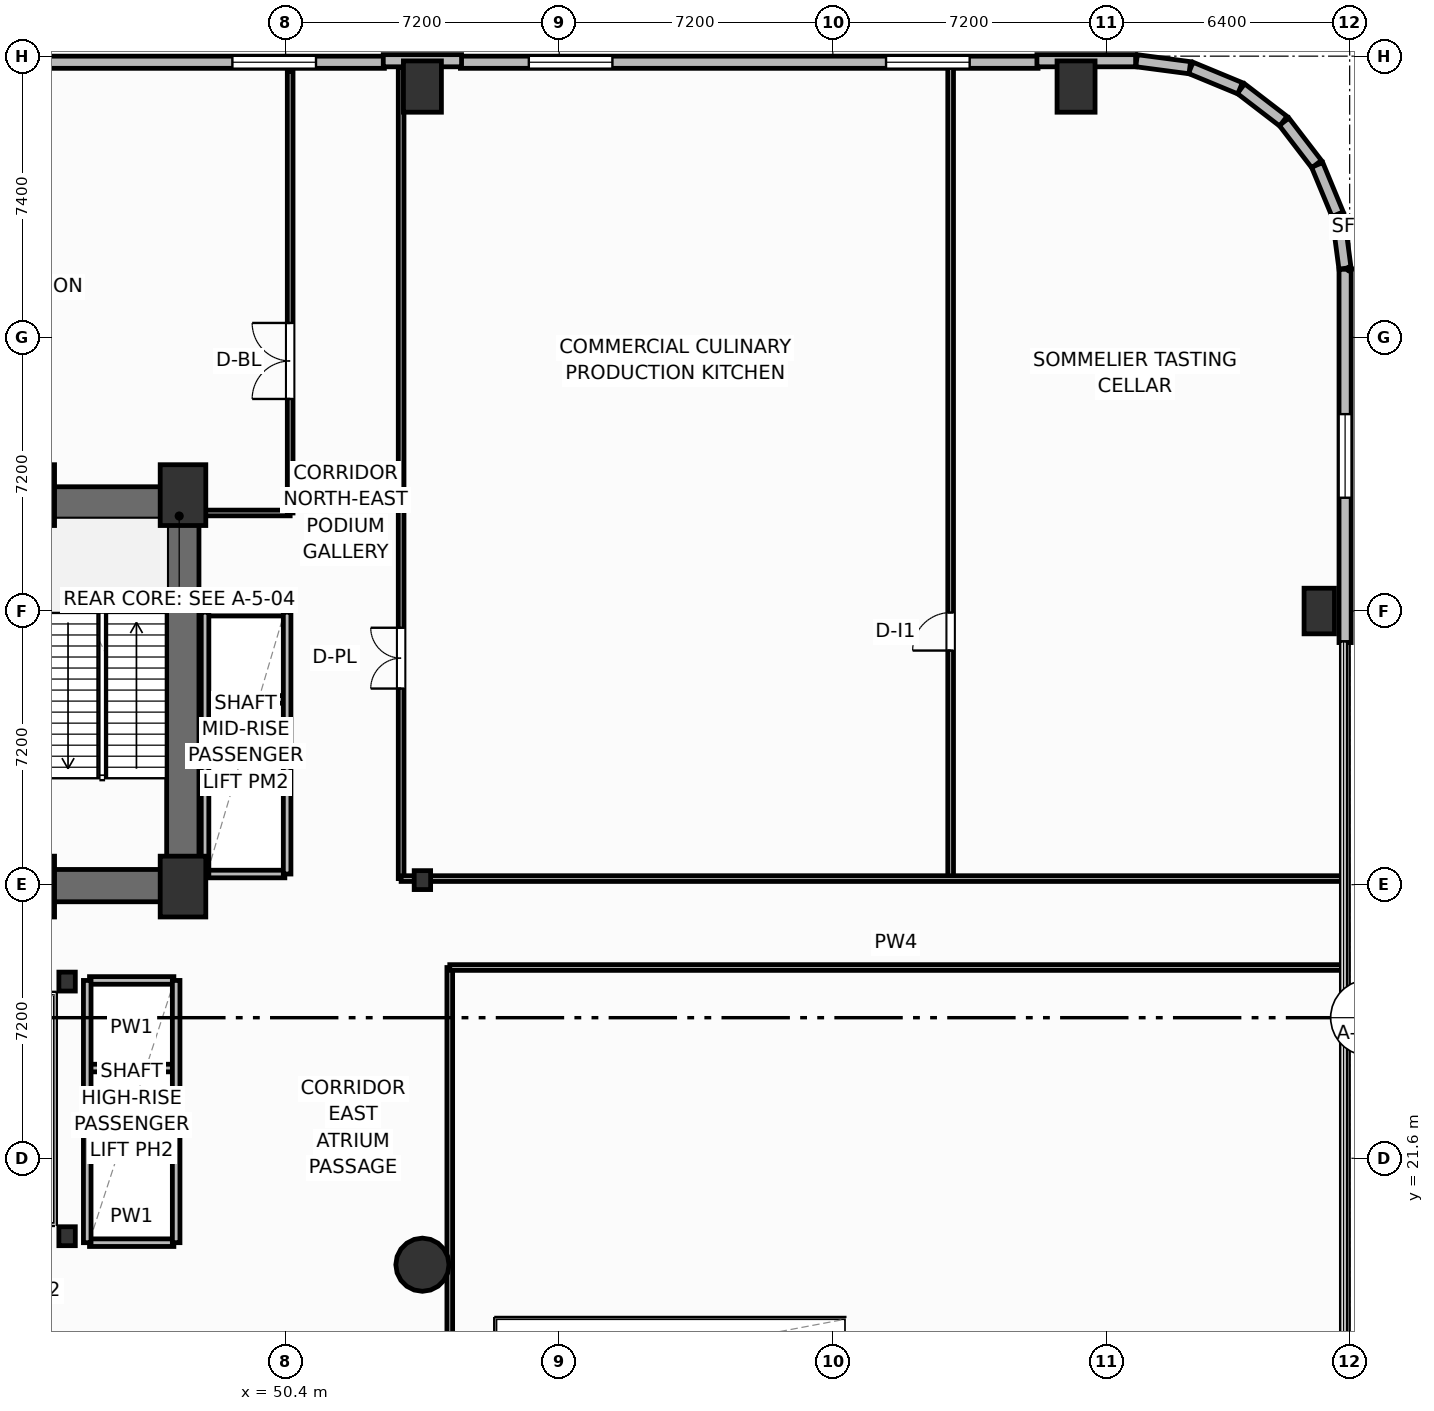
"""IFC4 building model, lengths in metres.
Left out: names, types, materials, properties, quantities, classifications, styles, units other than length and angle.
Written with IfcOpenShell. Run it as: python <this file> out.ifc"""

import sys

from ifc_helpers import new_model, si_unit, direction, frame, frame_2d, origin, origin_2d, place, context, subcontext, project, spatial, rectangle, circle, i_section, extrude, element, fill, save


model = new_model("IFC4")
c1 = context("Model", 3, precision=1e-05, world=origin(), true_north=direction((0.0, 1.0)))
c2 = subcontext(c1, "Body", "Model", "MODEL_VIEW")
j1 = project(units=[si_unit("LENGTHUNIT", "METRE"), si_unit("PLANEANGLEUNIT", "RADIAN")], contexts=[c1])
p1 = place(None, origin())
s1 = spatial("IfcSite", under=j1, at=p1, CompositionType="ELEMENT")
p2 = place(p1, origin())
s2 = spatial("IfcBuilding", under=s1, at=p2, CompositionType="ELEMENT")
p3 = place(p2, frame((0.0, 0.0, 10.8)))
s3 = spatial("IfcBuildingStorey", under=s2, at=p3, CompositionType="ELEMENT", Elevation=10.8)
for number, where, z_axis, x_axis in (
    (1, (43.72, 28.75, 0.0), (0.0, 0.0, 1.0), (1.0, 0.0, 0.0)),
    (2, (47.7, 28.75, 0.0), (0.0, 0.0, 1.0), (1.0, 0.0, 0.0)),
    (3, (43.72, 39.05, 0.0), (0.0, 0.0, 1.0), (1.0, 0.0, 0.0)),
    (4, (47.7, 39.05, 0.0), (0.0, 0.0, 1.0), (1.0, 0.0, 0.0)),
):
    element("IfcColumn", number, at=place(p3, frame(where, z_axis=z_axis, x_axis=x_axis)), inside=s3, PredefinedType="COLUMN", context=c2, shape_type="SweptSolid", body=[
        extrude(rectangle(XDim=1.2, YDim=1.6, at=origin_2d()), origin(), (0.0, 0.0, 1.0), 5.4),
    ])
for number, where, z_axis, x_axis in (
    (5, (44.65, 19.55, 0.0), (0.0, 0.0, 1.0), (1.0, 0.0, 0.0)),
    (6, (44.65, 26.25, 0.0), (0.0, 0.0, 1.0), (1.0, 0.0, 0.0)),
    (7, (54.0, 28.92, 0.0), (0.0, 0.0, 1.0), (1.0, 0.0, 0.0)),
):
    element("IfcColumn", number, at=place(p3, frame(where, z_axis=z_axis, x_axis=x_axis)), inside=s3, PredefinedType="COLUMN", context=c2, shape_type="SweptSolid", body=[
        extrude(i_section(OverallWidth=0.432, OverallDepth=0.498, WebThickness=0.056, FlangeThickness=0.089, FilletRadius=0.025, at=origin_2d()), origin(), (0.0, 0.0, 1.0), 5.4),
    ])
p4 = place(p3, frame((30.28, 38.845, 0.0), z_axis=(0.0, 0.0, 1.0), x_axis=(1.0, 0.0, 0.0)))
e8 = element("IfcWall", 8, at=p4, inside=s3, PredefinedType="SHEAR", context=c2, shape_type="SweptSolid", body=[
    extrude(rectangle(XDim=17.84, YDim=0.85, at=frame_2d((8.92, 0.0))), origin(), (0.0, 0.0, 1.0), 5.12),
])
p5 = place(p3, frame((47.695, 29.2, 0.0), z_axis=(0.0, 0.0, 1.0), x_axis=(0.0, 1.0, 0.0)))
e9 = element("IfcWall", 9, at=p5, inside=s3, PredefinedType="SHEAR", context=c2, shape_type="SweptSolid", body=[
    extrude(rectangle(XDim=9.22, YDim=0.85, at=frame_2d((4.61, 0.0))), origin(), (0.0, 0.0, 1.0), 5.12),
])
p6 = place(p3, frame((43.6, 28.775, 0.0), z_axis=(0.0, 0.0, 1.0), x_axis=(1.0, 0.0, 0.0)))
e10 = element("IfcWall", 10, at=p6, inside=s3, PredefinedType="SHEAR", context=c2, shape_type="SweptSolid", body=[
    extrude(rectangle(XDim=4.52, YDim=0.85, at=frame_2d((2.26, 0.0))), origin(), (0.0, 0.0, 1.0), 5.12),
])
p7 = place(p3, frame((54.0, 18.8, 0.0), z_axis=(0.0, 0.0, 1.0), x_axis=(1.0, 0.0, 0.0)))
e11 = element("IfcColumn", 11, at=p7, inside=s3, PredefinedType="COLUMN", context=c2, shape_type="SweptSolid", body=[
    extrude(circle(Radius=0.7, at=origin_2d()), origin(), (0.0, 0.0, 1.0), 5.4),
])
for number, where, z_axis, x_axis in (
    (12, (54.0, 49.8, 0.0), (0.0, 0.0, 1.0), (1.0, 0.0, 0.0)),
    (13, (71.2, 49.8, 0.0), (0.0, 0.0, 1.0), (1.0, 0.0, 0.0)),
):
    element("IfcColumn", number, at=place(p3, frame(where, z_axis=z_axis, x_axis=x_axis)), inside=s3, PredefinedType="COLUMN", context=c2, shape_type="SweptSolid", body=[
        extrude(rectangle(XDim=1.0, YDim=1.35, at=origin_2d()), origin(), (0.0, 0.0, 1.0), 5.4),
    ])
p8 = place(p3, frame((77.6, 36.0, 0.0), z_axis=(0.0, 0.0, 1.0), x_axis=(1.0, 0.0, 0.0)))
e14 = element("IfcColumn", 14, at=p8, inside=s3, PredefinedType="PILASTER", context=c2, shape_type="SweptSolid", body=[
    extrude(rectangle(XDim=0.8, YDim=1.2, at=origin_2d()), origin(), (0.0, 0.0, 1.0), 5.4),
])
p9 = place(p3, frame((25.4, 50.44, 0.0), z_axis=(0.0, 0.0, 1.0), x_axis=(1.0, 0.0, 0.0)))
e15 = element("IfcWall", 15, at=p9, inside=s3, PredefinedType="SOLIDWALL", context=c2, shape_type="SweptSolid", body=[
    extrude(rectangle(XDim=27.6, YDim=0.32, at=frame_2d((13.8, 0.0))), origin(), (0.0, 0.0, 1.0), 4.07),
])
p10 = place(p9, frame((1.8, 0.0, 0.8)))
e16 = element("IfcOpeningElement", 16, at=p10, cuts=e15, PredefinedType="OPENING", context=c2, shape_type="SweptSolid", body=[
    extrude(rectangle(XDim=2.2, YDim=1.85, at=frame_2d((1.1, 0.925))), frame((0.0, 0.17, 0.0), z_axis=(0.0, -1.0, 0.0), x_axis=(1.0, 0.0, 0.0)), (0.0, 0.0, 1.0), 0.34),
])
p11 = place(p9, frame((23.6, 0.0, 0.8)))
e17 = element("IfcOpeningElement", 17, at=p11, cuts=e15, PredefinedType="OPENING", context=c2, shape_type="SweptSolid", body=[
    extrude(rectangle(XDim=2.2, YDim=1.85, at=frame_2d((1.1, 0.925))), frame((0.0, 0.17, 0.0), z_axis=(0.0, -1.0, 0.0), x_axis=(1.0, 0.0, 0.0)), (0.0, 0.0, 1.0), 0.34),
])
p12 = place(p3, frame((55.0, 50.44, 0.0), z_axis=(0.0, 0.0, 1.0), x_axis=(1.0, 0.0, 0.0)))
e18 = element("IfcWall", 18, at=p12, inside=s3, PredefinedType="SOLIDWALL", context=c2, shape_type="SweptSolid", body=[
    extrude(rectangle(XDim=15.2, YDim=0.32, at=frame_2d((7.6, 0.0))), origin(), (0.0, 0.0, 1.0), 4.07),
])
p13 = place(p12, frame((1.8, 0.0, 0.8)))
e19 = element("IfcOpeningElement", 19, at=p13, cuts=e18, PredefinedType="OPENING", context=c2, shape_type="SweptSolid", body=[
    extrude(rectangle(XDim=2.2, YDim=1.85, at=frame_2d((1.1, 0.925))), frame((0.0, 0.17, 0.0), z_axis=(0.0, -1.0, 0.0), x_axis=(1.0, 0.0, 0.0)), (0.0, 0.0, 1.0), 0.34),
])
p14 = place(p12, frame((11.2, 0.0, 0.8)))
e20 = element("IfcOpeningElement", 20, at=p14, cuts=e18, PredefinedType="OPENING", context=c2, shape_type="SweptSolid", body=[
    extrude(rectangle(XDim=2.2, YDim=1.85, at=frame_2d((1.1, 0.925))), frame((0.0, 0.17, 0.0), z_axis=(0.0, -1.0, 0.0), x_axis=(1.0, 0.0, 0.0)), (0.0, 0.0, 1.0), 0.34),
])
p15 = place(p3, frame((78.28, 35.17, 0.0), z_axis=(0.0, 0.0, 1.0), x_axis=(0.0, 1.0, 0.0)))
e21 = element("IfcWall", 21, at=p15, inside=s3, PredefinedType="SOLIDWALL", context=c2, shape_type="SweptSolid", body=[
    extrude(rectangle(XDim=9.822, YDim=0.32, at=frame_2d((4.911, 0.0))), origin(), (0.0, 0.0, 1.0), 4.07),
])
p16 = place(p15, frame((3.811, 0.0, 0.8)))
e22 = element("IfcOpeningElement", 22, at=p16, cuts=e21, PredefinedType="OPENING", context=c2, shape_type="SweptSolid", body=[
    extrude(rectangle(XDim=2.2, YDim=2.0, at=frame_2d((1.1, 1.0))), frame((0.0, 0.17, 0.0), z_axis=(0.0, -1.0, 0.0), x_axis=(1.0, 0.0, 0.0)), (0.0, 0.0, 1.0), 0.34),
])
p17 = place(p3, frame((78.277, 45.017, 0.0), z_axis=(0.0, 0.0, 1.0), x_axis=(-0.130409831203, 0.991460173646, 0.0)))
e23 = element("IfcWall", 23, at=p17, inside=s3, PredefinedType="SOLIDWALL", context=c2, shape_type="SweptSolid", body=[
    extrude(rectangle(XDim=1.413, YDim=0.32, at=frame_2d((0.707, 0.0))), origin(), (0.0, 0.0, 1.0), 4.07),
])
for number, where, z_axis, x_axis in (
    (24, (78.083, 46.441, 0.0), (0.0, 0.0, 1.0), (-0.383, 0.924, 0.0)),
    (25, (77.53, 47.759, 0.0), (0.0, 0.0, 1.0), (-0.609, 0.793, 0.0)),
    (26, (76.654, 48.889, 0.0), (0.0, 0.0, 1.0), (-0.793, 0.609, 0.0)),
    (27, (75.516, 49.754, 0.0), (0.0, 0.0, 1.0), (-0.924, 0.383, 0.0)),
):
    element("IfcWall", number, at=place(p3, frame(where, z_axis=z_axis, x_axis=x_axis)), inside=s3, PredefinedType="SOLIDWALL", context=c2, shape_type="SweptSolid", body=[
        extrude(rectangle(XDim=1.405, YDim=0.32, at=frame_2d((0.703, 0.0))), origin(), (0.0, 0.0, 1.0), 4.07),
    ])
p18 = place(p3, frame((74.193, 50.296, 0.0), z_axis=(0.0, 0.0, 1.0), x_axis=(-0.991460173646, 0.130409831203, 0.0)))
e28 = element("IfcWall", 28, at=p18, inside=s3, PredefinedType="SOLIDWALL", context=c2, shape_type="SweptSolid", body=[
    extrude(rectangle(XDim=1.413, YDim=0.32, at=frame_2d((0.707, 0.0))), origin(), (0.0, 0.0, 1.0), 4.07),
])
p19 = place(p3, frame((72.767, 50.48, 0.0), z_axis=(0.0, 0.0, 1.0), x_axis=(-1.0, 0.0, 0.0)))
e29 = element("IfcWall", 29, at=p19, inside=s3, PredefinedType="SOLIDWALL", context=c2, shape_type="SweptSolid", body=[
    extrude(rectangle(XDim=2.597, YDim=0.32, at=frame_2d((1.299, 0.0))), origin(), (0.0, 0.0, 1.0), 4.07),
])
p20 = place(p3, frame((55.03, 50.48, 0.0), z_axis=(0.0, 0.0, 1.0), x_axis=(-1.0, 0.0, 0.0)))
e30 = element("IfcWall", 30, at=p20, inside=s3, PredefinedType="SOLIDWALL", context=c2, shape_type="SweptSolid", body=[
    extrude(rectangle(XDim=2.06, YDim=0.32, at=frame_2d((1.03, 0.0))), origin(), (0.0, 0.0, 1.0), 4.07),
])
p21 = place(p3, frame((48.12, 38.58, 0.0), z_axis=(0.0, 0.0, 1.0), x_axis=(1.0, 0.0, 0.0)))
e31 = element("IfcWall", 31, at=p21, inside=s3, PredefinedType="PARTITIONING", context=c2, shape_type="SweptSolid", body=[
    extrude(rectangle(XDim=2.4, YDim=0.15, at=frame_2d((1.2, 0.0))), origin(), (0.0, 0.0, 1.0), 4.085),
])
p22 = place(p3, frame((50.52, 38.58, 0.0), z_axis=(0.0, 0.0, 1.0), x_axis=(0.0, 1.0, 0.0)))
e32 = element("IfcWall", 32, at=p22, inside=s3, PredefinedType="PARTITIONING", context=c2, shape_type="SweptSolid", body=[
    extrude(rectangle(XDim=11.62, YDim=0.15, at=frame_2d((5.81, 0.0))), origin(), (0.0, 0.0, 1.0), 5.12),
])
p23 = place(p22, frame((3.0, 0.0, 0.0)))
e33 = element("IfcOpeningElement", 33, at=p23, cuts=e32, PredefinedType="OPENING", context=c2, shape_type="SweptSolid", body=[
    extrude(rectangle(XDim=2.0, YDim=2.05, at=frame_2d((1.0, 1.025))), frame((0.0, 0.085, 0.0), z_axis=(0.0, -1.0, 0.0), x_axis=(1.0, 0.0, 0.0)), (0.0, 0.0, 1.0), 0.17),
])
p24 = place(p3, frame((54.72, 0.25, 0.0), z_axis=(0.0, 0.0, 1.0), x_axis=(0.0, 1.0, 0.0)))
e34 = element("IfcWall", 34, at=p24, inside=s3, PredefinedType="PARTITIONING", context=c2, shape_type="SweptSolid", body=[
    extrude(rectangle(XDim=26.37, YDim=0.15, at=frame_2d((13.185, 0.0))), origin(), (0.0, 0.0, 1.0), 5.12),
])
p25 = place(p24, frame((14.514, 0.0, 0.0)))
e35 = element("IfcOpeningElement", 35, at=p25, cuts=e34, PredefinedType="OPENING", context=c2, shape_type="SweptSolid", body=[
    extrude(rectangle(XDim=2.0, YDim=2.05, at=frame_2d((1.0, 1.025))), frame((0.0, 0.085, 0.0), z_axis=(0.0, -1.0, 0.0), x_axis=(1.0, 0.0, 0.0)), (0.0, 0.0, 1.0), 0.17),
])
p26 = place(p3, frame((54.72, 26.62, 0.0), z_axis=(0.0, 0.0, 1.0), x_axis=(1.0, 0.0, 0.0)))
e36 = element("IfcWall", 36, at=p26, inside=s3, PredefinedType="PARTITIONING", context=c2, shape_type="SweptSolid", body=[
    extrude(rectangle(XDim=23.48, YDim=0.15, at=frame_2d((11.74, 0.0))), origin(), (0.0, 0.0, 1.0), 5.12),
])
p27 = place(p3, frame((53.44, 28.96, 0.0), z_axis=(0.0, 0.0, 1.0), x_axis=(0.0, 1.0, 0.0)))
e37 = element("IfcWall", 37, at=p27, inside=s3, PredefinedType="PARTITIONING", context=c2, shape_type="SweptSolid", body=[
    extrude(rectangle(XDim=21.34, YDim=0.15, at=frame_2d((10.67, 0.0))), origin(), (0.0, 0.0, 1.0), 5.12),
])
p28 = place(p27, frame((5.0, 0.0, 0.0)))
e38 = element("IfcOpeningElement", 38, at=p28, cuts=e37, PredefinedType="OPENING", context=c2, shape_type="SweptSolid", body=[
    extrude(rectangle(XDim=1.6, YDim=2.05, at=frame_2d((0.8, 1.025))), frame((0.0, 0.085, 0.0), z_axis=(0.0, -1.0, 0.0), x_axis=(1.0, 0.0, 0.0)), (0.0, 0.0, 1.0), 0.17),
])
p29 = place(p3, frame((67.9, 28.96, 0.0), z_axis=(0.0, 0.0, 1.0), x_axis=(0.0, 1.0, 0.0)))
e39 = element("IfcWall", 39, at=p29, inside=s3, PredefinedType="PARTITIONING", context=c2, shape_type="SweptSolid", body=[
    extrude(rectangle(XDim=21.34, YDim=0.15, at=frame_2d((10.67, 0.0))), origin(), (0.0, 0.0, 1.0), 5.12),
])
p30 = place(p29, frame((6.0, 0.0, 0.0)))
e40 = element("IfcOpeningElement", 40, at=p30, cuts=e39, PredefinedType="OPENING", context=c2, shape_type="SweptSolid", body=[
    extrude(rectangle(XDim=1.0, YDim=2.05, at=frame_2d((0.5, 1.025))), frame((0.0, 0.085, 0.0), z_axis=(0.0, -1.0, 0.0), x_axis=(1.0, 0.0, 0.0)), (0.0, 0.0, 1.0), 0.17),
])
p31 = place(p3, frame((53.44, 28.96, 0.0), z_axis=(0.0, 0.0, 1.0), x_axis=(1.0, 0.0, 0.0)))
e41 = element("IfcWall", 41, at=p31, inside=s3, PredefinedType="PARTITIONING", context=c2, shape_type="SweptSolid", body=[
    extrude(rectangle(XDim=24.76, YDim=0.15, at=frame_2d((12.38, 0.0))), origin(), (0.0, 0.0, 1.0), 4.332),
])
for number, where, z_axis, x_axis in (
    (42, (48.32, 31.375, 0.0), (0.0, 0.0, 1.0), (1.0, 0.0, 0.0)),
    (43, (48.32, 33.675, 0.0), (0.0, 0.0, 1.0), (1.0, 0.0, 0.0)),
):
    element("IfcWall", number, at=place(p3, frame(where, z_axis=z_axis, x_axis=x_axis)), inside=s3, PredefinedType="PARTITIONING", context=c2, shape_type="SweptSolid", body=[
        extrude(rectangle(XDim=2.06, YDim=0.2, at=frame_2d((1.03, 0.0))), origin(), (0.0, 0.0, 1.0), 5.12),
    ])
p32 = place(p3, frame((48.32, 29.08, 0.0), z_axis=(0.0, 0.0, 1.0), x_axis=(1.0, 0.0, 0.0)))
e44 = element("IfcWall", 44, at=p32, inside=s3, PredefinedType="PARTITIONING", context=c2, shape_type="SweptSolid", body=[
    extrude(rectangle(XDim=2.06, YDim=0.2, at=frame_2d((1.03, 0.0))), origin(), (0.0, 0.0, 1.0), 4.332),
])
p33 = place(p3, frame((48.32, 35.97, 0.0), z_axis=(0.0, 0.0, 1.0), x_axis=(1.0, 0.0, 0.0)))
e45 = element("IfcWall", 45, at=p33, inside=s3, PredefinedType="PARTITIONING", context=c2, shape_type="SweptSolid", body=[
    extrude(rectangle(XDim=2.06, YDim=0.2, at=frame_2d((1.03, 0.0))), origin(), (0.0, 0.0, 1.0), 5.12),
])
for number, where, z_axis, x_axis in (
    (46, (48.28, 29.08, 0.0), (0.0, 0.0, 1.0), (0.0, 1.0, 0.0)),
    (47, (50.44, 29.08, 0.0), (0.0, 0.0, 1.0), (0.0, 1.0, 0.0)),
):
    element("IfcWall", number, at=place(p3, frame(where, z_axis=z_axis, x_axis=x_axis)), inside=s3, PredefinedType="PARTITIONING", context=c2, shape_type="SweptSolid", body=[
        extrude(rectangle(XDim=6.89, YDim=0.2, at=frame_2d((3.445, 0.0))), origin(), (0.0, 0.0, 1.0), 5.12),
    ])
for number, where, z_axis, x_axis in (
    (48, (45.24, 21.675, 0.0), (0.0, 0.0, 1.0), (1.0, 0.0, 0.0)),
    (49, (45.24, 23.975, 0.0), (0.0, 0.0, 1.0), (1.0, 0.0, 0.0)),
    (50, (45.24, 19.38, 0.0), (0.0, 0.0, 1.0), (1.0, 0.0, 0.0)),
    (51, (45.24, 26.28, 0.0), (0.0, 0.0, 1.0), (1.0, 0.0, 0.0)),
):
    element("IfcWall", number, at=place(p3, frame(where, z_axis=z_axis, x_axis=x_axis)), inside=s3, PredefinedType="PARTITIONING", context=c2, shape_type="SweptSolid", body=[
        extrude(rectangle(XDim=2.22, YDim=0.2, at=frame_2d((1.11, 0.0))), origin(), (0.0, 0.0, 1.0), 5.12),
    ])
for number, where, z_axis, x_axis in (
    (52, (45.18, 19.38, 0.0), (0.0, 0.0, 1.0), (0.0, 1.0, 0.0)),
    (53, (47.52, 19.38, 0.0), (0.0, 0.0, 1.0), (0.0, 1.0, 0.0)),
):
    element("IfcWall", number, at=place(p3, frame(where, z_axis=z_axis, x_axis=x_axis)), inside=s3, PredefinedType="PARTITIONING", context=c2, shape_type="SweptSolid", body=[
        extrude(rectangle(XDim=6.9, YDim=0.2, at=frame_2d((3.45, 0.0))), origin(), (0.0, 0.0, 1.0), 5.12),
    ])
p34 = place(p11, origin())
e54 = element("IfcWindow", 54, at=p34, inside=s3, PartitioningType="SINGLE_PANEL", PredefinedType="WINDOW", context=c2, shape_type="SweptSolid", body=[
    extrude(rectangle(XDim=2.2, YDim=1.85, at=frame_2d((1.1, 0.925))), frame((0.0, 0.03, 0.0), z_axis=(0.0, -1.0, 0.0), x_axis=(1.0, 0.0, 0.0)), (0.0, 0.0, 1.0), 0.06),
])
fill(e17, e54)
p35 = place(p13, origin())
e55 = element("IfcWindow", 55, at=p35, inside=s3, PartitioningType="SINGLE_PANEL", PredefinedType="WINDOW", context=c2, shape_type="SweptSolid", body=[
    extrude(rectangle(XDim=2.2, YDim=1.85, at=frame_2d((1.1, 0.925))), frame((0.0, 0.03, 0.0), z_axis=(0.0, -1.0, 0.0), x_axis=(1.0, 0.0, 0.0)), (0.0, 0.0, 1.0), 0.06),
])
fill(e19, e55)
p36 = place(p14, origin())
e56 = element("IfcWindow", 56, at=p36, inside=s3, PartitioningType="SINGLE_PANEL", PredefinedType="WINDOW", context=c2, shape_type="SweptSolid", body=[
    extrude(rectangle(XDim=2.2, YDim=1.85, at=frame_2d((1.1, 0.925))), frame((0.0, 0.03, 0.0), z_axis=(0.0, -1.0, 0.0), x_axis=(1.0, 0.0, 0.0)), (0.0, 0.0, 1.0), 0.06),
])
fill(e20, e56)
p37 = place(p16, origin())
e57 = element("IfcWindow", 57, at=p37, inside=s3, PartitioningType="SINGLE_PANEL", PredefinedType="WINDOW", context=c2, shape_type="SweptSolid", body=[
    extrude(rectangle(XDim=2.2, YDim=2.0, at=frame_2d((1.1, 1.0))), frame((0.0, 0.03, 0.0), z_axis=(0.0, -1.0, 0.0), x_axis=(1.0, 0.0, 0.0)), (0.0, 0.0, 1.0), 0.06),
])
fill(e22, e57)
p38 = place(p23, origin())
e58 = element("IfcDoor", 58, at=p38, inside=s3, OperationType="DOUBLE_DOOR_SINGLE_SWING", PredefinedType="DOOR", context=c2, shape_type="SweptSolid", body=[
    extrude(rectangle(XDim=2.0, YDim=2.05, at=frame_2d((1.0, 1.025))), frame((0.0, 0.025, 0.0), z_axis=(0.0, -1.0, 0.0), x_axis=(1.0, 0.0, 0.0)), (0.0, 0.0, 1.0), 0.05),
])
fill(e33, e58)
p39 = place(p28, origin())
e59 = element("IfcDoor", 59, at=p39, inside=s3, OperationType="DOUBLE_DOOR_SINGLE_SWING", PredefinedType="DOOR", context=c2, shape_type="SweptSolid", body=[
    extrude(rectangle(XDim=1.6, YDim=2.05, at=frame_2d((0.8, 1.025))), frame((0.0, 0.025, 0.0), z_axis=(0.0, -1.0, 0.0), x_axis=(1.0, 0.0, 0.0)), (0.0, 0.0, 1.0), 0.05),
])
fill(e38, e59)
p40 = place(p30, origin())
e60 = element("IfcDoor", 60, at=p40, inside=s3, OperationType="SINGLE_SWING_LEFT", PredefinedType="DOOR", context=c2, shape_type="SweptSolid", body=[
    extrude(rectangle(XDim=1.0, YDim=2.05, at=frame_2d((0.5, 1.025))), frame((0.0, 0.025, 0.0), z_axis=(0.0, -1.0, 0.0), x_axis=(1.0, 0.0, 0.0)), (0.0, 0.0, 1.0), 0.05),
])
fill(e40, e60)
save(model, sys.argv[1])
